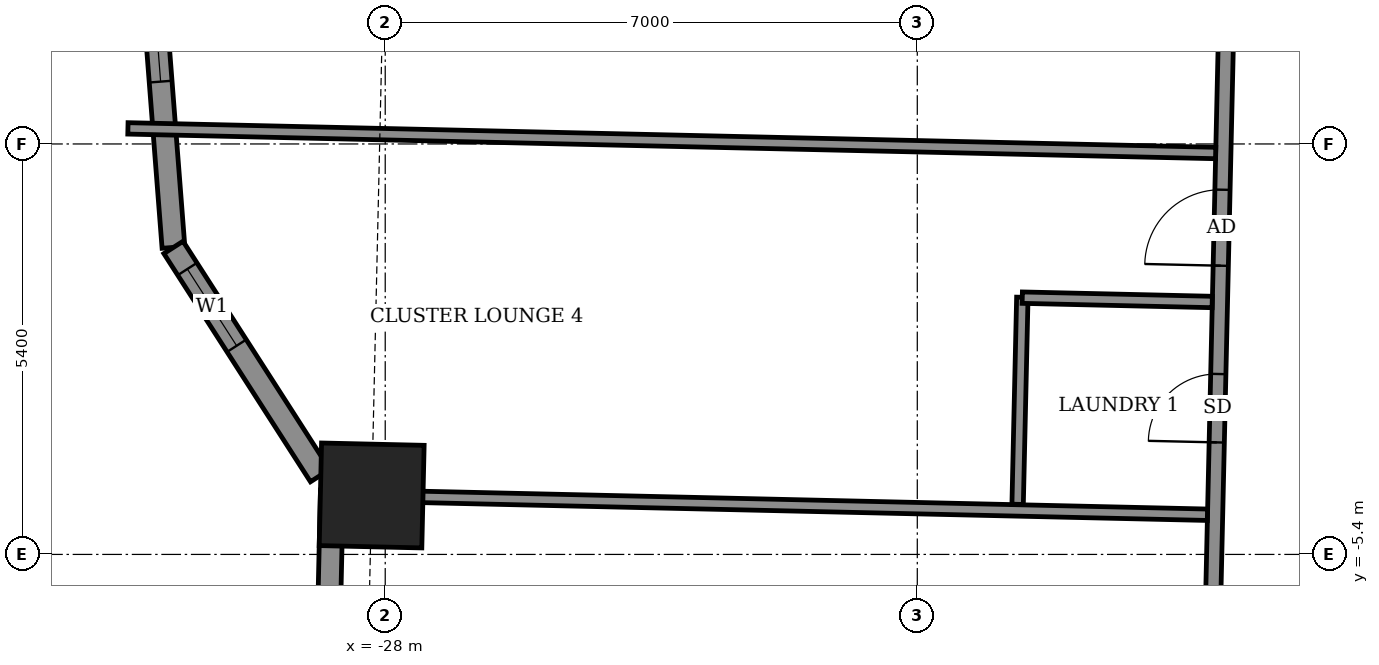
"""IFC4 building model, lengths in metres.
Left out: names, types, materials, properties, quantities, classifications, styles, units other than length and angle.
Written with IfcOpenShell. Run it as: python <this file> out.ifc"""

import sys

from ifc_helpers import new_model, si_unit, direction, frame, frame_2d, origin, origin_2d, place, context, subcontext, project, spatial, rectangle, extrude, element, fill, save


model = new_model("IFC4")
c1 = context("Model", 3, precision=1e-05, world=origin(), true_north=direction((0.0, 1.0)))
c2 = subcontext(c1, "Body", "Model", "MODEL_VIEW")
j1 = project(units=[si_unit("LENGTHUNIT", "METRE"), si_unit("PLANEANGLEUNIT", "RADIAN")], contexts=[c1])
p1 = place(None, origin())
s1 = spatial("IfcSite", under=j1, at=p1, CompositionType="ELEMENT")
p2 = place(p1, origin())
s2 = spatial("IfcBuilding", under=s1, at=p2, CompositionType="ELEMENT")
p3 = place(p2, frame((0.0, 0.0, 112.7)))
s3 = spatial("IfcBuildingStorey", under=s2, at=p3, CompositionType="ELEMENT", Elevation=112.7)
p4 = place(p3, frame((-28.178, -4.624, -0.55), z_axis=(0.0, 0.0, 1.0), x_axis=(-0.022695691547, -0.999742419619, 0.0)))
e1 = element("IfcColumn", 1, at=p4, inside=s3, PredefinedType="COLUMN", context=c2, shape_type="SweptSolid", body=[
    extrude(rectangle(XDim=1.35, YDim=1.35, at=origin_2d()), origin(), (0.0, 0.0, 1.0), 3.6),
])
p5 = place(p3, frame((-31.216, 4.196, 0.0), z_axis=(0.0, 0.0, 1.0), x_axis=(0.077178825362, -0.997017266107, 0.0)))
e2 = element("IfcWall", 2, at=p5, inside=s3, PredefinedType="SOLIDWALL", context=c2, shape_type="SweptSolid", body=[
    extrude(rectangle(XDim=5.574, YDim=0.3, at=frame_2d((2.787, 0.0))), origin(), (0.0, 0.0, 1.0), 3.05),
])
p6 = place(p5, frame((2.186, 0.0, 0.9)))
e3 = element("IfcOpeningElement", 3, at=p6, cuts=e2, PredefinedType="OPENING", context=c2, shape_type="SweptSolid", body=[
    extrude(rectangle(XDim=1.2, YDim=1.5, at=frame_2d((0.6, 0.75))), frame((0.0, 0.16, 0.0), z_axis=(0.0, -1.0, 0.0), x_axis=(1.0, 0.0, 0.0)), (0.0, 0.0, 1.0), 0.32),
])
p7 = place(p3, frame((-30.786, -1.361, 0.0), z_axis=(0.0, 0.0, 1.0), x_axis=(0.54058467792, -0.841289608873, 0.0)))
e4 = element("IfcWall", 4, at=p7, inside=s3, PredefinedType="SOLIDWALL", context=c2, shape_type="SweptSolid", body=[
    extrude(rectangle(XDim=3.568, YDim=0.3, at=frame_2d((1.784, 0.0))), origin(), (0.0, 0.0, 1.0), 3.05),
])
p8 = place(p7, frame((0.338, 0.0, 0.9)))
e5 = element("IfcOpeningElement", 5, at=p8, cuts=e4, PredefinedType="OPENING", context=c2, shape_type="SweptSolid", body=[
    extrude(rectangle(XDim=1.2, YDim=1.5, at=frame_2d((0.6, 0.75))), frame((0.0, 0.16, 0.0), z_axis=(0.0, -1.0, 0.0), x_axis=(1.0, 0.0, 0.0)), (0.0, 0.0, 1.0), 0.32),
])
p9 = place(p3, frame((-28.702, -4.557, 0.0), z_axis=(0.0, 0.0, 1.0), x_axis=(-0.022653729471, -0.999743371341, 0.0)))
e6 = element("IfcWall", 6, at=p9, inside=s3, PredefinedType="SOLIDWALL", context=c2, shape_type="SweptSolid", body=[
    extrude(rectangle(XDim=13.03, YDim=0.3, at=frame_2d((6.515, 0.0))), origin(), (0.0, 0.0, 1.0), 3.05),
])
p10 = place(p9, frame((2.586, 0.0, 0.0)))
e7 = element("IfcOpeningElement", 7, at=p10, cuts=e6, PredefinedType="OPENING", context=c2, shape_type="SweptSolid", body=[
    extrude(rectangle(XDim=1.5, YDim=2.4, at=frame_2d((0.75, 1.2))), frame((0.0, 0.16, 0.0), z_axis=(0.0, -1.0, 0.0), x_axis=(1.0, 0.0, 0.0)), (0.0, 0.0, 1.0), 0.32),
])
p11 = place(p9, frame((7.629, 0.0, 0.9)))
e8 = element("IfcOpeningElement", 8, at=p11, cuts=e6, PredefinedType="OPENING", context=c2, shape_type="SweptSolid", body=[
    extrude(rectangle(XDim=0.9, YDim=1.5, at=frame_2d((0.45, 0.75))), frame((0.0, 0.16, 0.0), z_axis=(0.0, -1.0, 0.0), x_axis=(1.0, 0.0, 0.0)), (0.0, 0.0, 1.0), 0.32),
])
p12 = place(p9, frame((9.256, 0.0, 0.9)))
e9 = element("IfcOpeningElement", 9, at=p12, cuts=e6, PredefinedType="OPENING", context=c2, shape_type="SweptSolid", body=[
    extrude(rectangle(XDim=2.4, YDim=1.5, at=frame_2d((1.2, 0.75))), frame((0.0, 0.16, 0.0), z_axis=(0.0, -1.0, 0.0), x_axis=(1.0, 0.0, 0.0)), (0.0, 0.0, 1.0), 0.32),
])
p13 = place(p3, frame((-17.247, -12.149, 0.0), z_axis=(0.0, 0.0, 1.0), x_axis=(0.022696191528, 0.999742408268, 0.0)))
e10 = element("IfcWall", 10, at=p13, inside=s3, PredefinedType="PARTITIONING", context=c2, shape_type="SweptSolid", body=[
    extrude(rectangle(XDim=25.074, YDim=0.2, at=frame_2d((12.537, 0.0))), origin(), (0.0, 0.0, 1.0), 3.05),
])
p14 = place(p13, frame((16.875, 0.0, 0.0)))
e11 = element("IfcOpeningElement", 11, at=p14, cuts=e10, PredefinedType="OPENING", context=c2, shape_type="SweptSolid", body=[
    extrude(rectangle(XDim=1.0, YDim=2.1, at=frame_2d((0.5, 1.05))), frame((0.0, 0.11, 0.0), z_axis=(0.0, -1.0, 0.0), x_axis=(1.0, 0.0, 0.0)), (0.0, 0.0, 1.0), 0.22),
])
p15 = place(p13, frame((19.275, 0.0, 0.0)))
e12 = element("IfcOpeningElement", 12, at=p15, cuts=e10, PredefinedType="OPENING", context=c2, shape_type="SweptSolid", body=[
    extrude(rectangle(XDim=0.9, YDim=2.1, at=frame_2d((0.45, 1.05))), frame((0.0, 0.11, 0.0), z_axis=(0.0, -1.0, 0.0), x_axis=(1.0, 0.0, 0.0)), (0.0, 0.0, 1.0), 0.22),
])
p16 = place(p13, frame((13.675, 0.0, 0.0)))
e13 = element("IfcOpeningElement", 13, at=p16, cuts=e10, PredefinedType="OPENING", context=c2, shape_type="SweptSolid", body=[
    extrude(rectangle(XDim=1.0, YDim=2.1, at=frame_2d((0.5, 1.05))), frame((0.0, 0.11, 0.0), z_axis=(0.0, -1.0, 0.0), x_axis=(1.0, 0.0, 0.0)), (0.0, 0.0, 1.0), 0.22),
])
p17 = place(p13, frame((10.55, 0.0, 0.0)))
e14 = element("IfcOpeningElement", 14, at=p17, cuts=e10, PredefinedType="OPENING", context=c2, shape_type="SweptSolid", body=[
    extrude(rectangle(XDim=1.0, YDim=2.1, at=frame_2d((0.5, 1.05))), frame((0.0, 0.11, 0.0), z_axis=(0.0, -1.0, 0.0), x_axis=(1.0, 0.0, 0.0)), (0.0, 0.0, 1.0), 0.22),
])
p18 = place(p13, frame((8.225, 0.0, 0.0)))
e15 = element("IfcOpeningElement", 15, at=p18, cuts=e10, PredefinedType="OPENING", context=c2, shape_type="SweptSolid", body=[
    extrude(rectangle(XDim=0.9, YDim=2.1, at=frame_2d((0.45, 1.05))), frame((0.0, 0.11, 0.0), z_axis=(0.0, -1.0, 0.0), x_axis=(1.0, 0.0, 0.0)), (0.0, 0.0, 1.0), 0.22),
])
p19 = place(p13, frame((4.337, 0.0, 0.0)))
e16 = element("IfcOpeningElement", 16, at=p19, cuts=e10, PredefinedType="OPENING", context=c2, shape_type="SweptSolid", body=[
    extrude(rectangle(XDim=1.0, YDim=2.1, at=frame_2d((0.5, 1.05))), frame((0.0, 0.11, 0.0), z_axis=(0.0, -1.0, 0.0), x_axis=(1.0, 0.0, 0.0)), (0.0, 0.0, 1.0), 0.22),
])
p20 = place(p13, frame((0.75, 0.0, 0.0)))
e17 = element("IfcOpeningElement", 17, at=p20, cuts=e10, PredefinedType="OPENING", context=c2, shape_type="SweptSolid", body=[
    extrude(rectangle(XDim=0.9, YDim=2.1, at=frame_2d((0.45, 1.05))), frame((0.0, 0.11, 0.0), z_axis=(0.0, -1.0, 0.0), x_axis=(1.0, 0.0, 0.0)), (0.0, 0.0, 1.0), 0.22),
])
p21 = place(p3, frame((-28.553, -4.62, 0.0), z_axis=(0.0, 0.0, 1.0), x_axis=(0.999743020026, -0.022669228257, 0.0)))
e18 = element("IfcWall", 18, at=p21, inside=s3, PredefinedType="PARTITIONING", context=c2, shape_type="SweptSolid", body=[
    extrude(rectangle(XDim=11.373, YDim=0.15, at=frame_2d((5.687, 0.0))), origin(), (0.0, 0.0, 1.0), 3.05),
])
p22 = place(p3, frame((-19.68, -4.741, 0.0), z_axis=(0.0, 0.0, 1.0), x_axis=(0.022760079124, 0.999740955847, 0.0)))
e19 = element("IfcWall", 19, at=p22, inside=s3, PredefinedType="PARTITIONING", context=c2, shape_type="SweptSolid", body=[
    extrude(rectangle(XDim=2.725, YDim=0.15, at=frame_2d((1.362, 0.0))), origin(), (0.0, 0.0, 1.0), 3.05),
])
p23 = place(p3, frame((-19.619, -2.022, 0.0), z_axis=(0.0, 0.0, 1.0), x_axis=(0.999738750294, -0.02285675306, 0.0)))
e20 = element("IfcWall", 20, at=p23, inside=s3, PredefinedType="PARTITIONING", context=c2, shape_type="SweptSolid", body=[
    extrude(rectangle(XDim=2.5, YDim=0.15, at=frame_2d((1.25, 0.0))), origin(), (0.0, 0.0, 1.0), 3.05),
])
p24 = place(p3, frame((-31.385, 0.205, 0.0), z_axis=(0.0, 0.0, 1.0), x_axis=(0.99974382177, -0.022633842623, 0.0)))
e21 = element("IfcWall", 21, at=p24, inside=s3, PredefinedType="PARTITIONING", context=c2, shape_type="SweptSolid", body=[
    extrude(rectangle(XDim=14.314, YDim=0.15, at=frame_2d((7.157, 0.0))), origin(), (0.0, 0.0, 1.0), 2.1),
])
p25 = place(p6, origin())
e22 = element("IfcWindow", 22, at=p25, inside=s3, PartitioningType="SINGLE_PANEL", PredefinedType="WINDOW", context=c2, shape_type="SweptSolid", body=[
    extrude(rectangle(XDim=1.2, YDim=1.5, at=frame_2d((0.6, 0.75))), frame((0.0, 0.03, 0.0), z_axis=(0.0, -1.0, 0.0), x_axis=(1.0, 0.0, 0.0)), (0.0, 0.0, 1.0), 0.06),
])
fill(e3, e22)
p26 = place(p8, origin())
e23 = element("IfcWindow", 23, at=p26, inside=s3, PartitioningType="SINGLE_PANEL", PredefinedType="WINDOW", context=c2, shape_type="SweptSolid", body=[
    extrude(rectangle(XDim=1.2, YDim=1.5, at=frame_2d((0.6, 0.75))), frame((0.0, 0.03, 0.0), z_axis=(0.0, -1.0, 0.0), x_axis=(1.0, 0.0, 0.0)), (0.0, 0.0, 1.0), 0.06),
])
fill(e5, e23)
p27 = place(p17, origin())
e24 = element("IfcDoor", 24, at=p27, inside=s3, OperationType="SINGLE_SWING_RIGHT", PredefinedType="DOOR", context=c2, shape_type="SweptSolid", body=[
    extrude(rectangle(XDim=1.0, YDim=2.1, at=frame_2d((0.5, 1.05))), frame((0.0, 0.025, 0.0), z_axis=(0.0, -1.0, 0.0), x_axis=(1.0, 0.0, 0.0)), (0.0, 0.0, 1.0), 0.05),
])
fill(e14, e24)
p28 = place(p18, origin())
e25 = element("IfcDoor", 25, at=p28, inside=s3, OperationType="SINGLE_SWING_LEFT", PredefinedType="DOOR", context=c2, shape_type="SweptSolid", body=[
    extrude(rectangle(XDim=0.9, YDim=2.1, at=frame_2d((0.45, 1.05))), frame((0.0, 0.025, 0.0), z_axis=(0.0, -1.0, 0.0), x_axis=(1.0, 0.0, 0.0)), (0.0, 0.0, 1.0), 0.05),
])
fill(e15, e25)
save(model, sys.argv[1])
